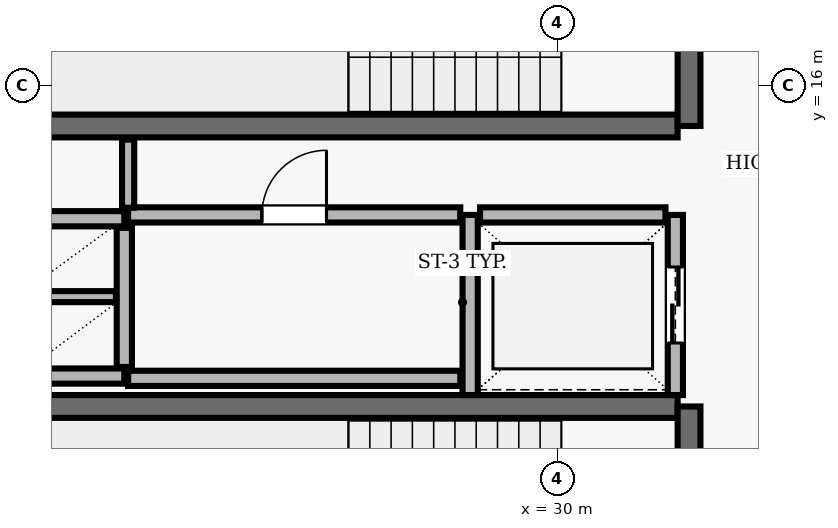
"""IFC4 building model, lengths in metres.
Left out: names, types, materials, properties, quantities, classifications, styles, units other than length and angle.
Written with IfcOpenShell. Run it as: python <this file> out.ifc"""

import sys

from ifc_helpers import new_model, si_unit, direction, frame, frame_2d, origin, place, context, subcontext, project, spatial, rectangle, extrude, element, fill, save


model = new_model("IFC4")
c1 = context("Model", 3, precision=1e-05, world=origin(), true_north=direction((0.0, 1.0)))
c2 = subcontext(c1, "Body", "Model", "MODEL_VIEW")
j1 = project(units=[si_unit("LENGTHUNIT", "METRE"), si_unit("PLANEANGLEUNIT", "RADIAN")], contexts=[c1])
p1 = place(None, origin())
s1 = spatial("IfcSite", under=j1, at=p1, CompositionType="ELEMENT")
p2 = place(p1, origin())
s2 = spatial("IfcBuilding", under=s1, at=p2, CompositionType="ELEMENT")
p3 = place(p2, frame((0.0, 0.0, 252.1)))
s3 = spatial("IfcBuildingStorey", under=s2, at=p3, CompositionType="ELEMENT", Elevation=252.1)
p4 = place(p3, frame((23.22, 15.47, 0.0), z_axis=(0.0, 0.0, 1.0), x_axis=(1.0, 0.0, 0.0)))
e1 = element("IfcWall", 1, at=p4, inside=s3, PredefinedType="SHEAR", context=c2, shape_type="SweptSolid", body=[
    extrude(rectangle(XDim=8.36, YDim=0.3, at=frame_2d((4.18, 0.0))), origin(), (0.0, 0.0, 1.0), 3.69),
])
p5 = place(p3, frame((31.73, 15.47, 0.0), z_axis=(0.0, 0.0, 1.0), x_axis=(0.0, 1.0, 0.0)))
e2 = element("IfcWall", 2, at=p5, inside=s3, PredefinedType="SHEAR", context=c2, shape_type="SweptSolid", body=[
    extrude(rectangle(XDim=3.51, YDim=0.3, at=frame_2d((1.755, 0.0))), origin(), (0.0, 0.0, 1.0), 3.69),
])
p6 = place(p5, frame((1.18, 0.0, 0.0)))
e3 = element("IfcOpeningElement", 3, at=p6, cuts=e2, PredefinedType="OPENING", context=c2, shape_type="SweptSolid", body=[
    extrude(rectangle(XDim=1.15, YDim=2.15, at=frame_2d((0.575, 1.075))), frame((0.0, 0.16, 0.0), z_axis=(0.0, -1.0, 0.0), x_axis=(1.0, 0.0, 0.0)), (0.0, 0.0, 1.0), 0.32),
])
p7 = place(p3, frame((31.58, 11.78, 0.0), z_axis=(0.0, 0.0, 1.0), x_axis=(-1.0, 0.0, 0.0)))
e4 = element("IfcWall", 4, at=p7, inside=s3, PredefinedType="SHEAR", context=c2, shape_type="SweptSolid", body=[
    extrude(rectangle(XDim=8.36, YDim=0.3, at=frame_2d((4.18, 0.0))), origin(), (0.0, 0.0, 1.0), 3.69),
])
p8 = place(p3, frame((31.73, 8.27, 0.0), z_axis=(0.0, 0.0, 1.0), x_axis=(0.0, 1.0, 0.0)))
e5 = element("IfcWall", 5, at=p8, inside=s3, PredefinedType="SHEAR", context=c2, shape_type="SweptSolid", body=[
    extrude(rectangle(XDim=3.51, YDim=0.3, at=frame_2d((1.755, 0.0))), origin(), (0.0, 0.0, 1.0), 3.69),
])
p9 = place(p8, frame((1.18, 0.0, 0.0)))
e6 = element("IfcOpeningElement", 6, at=p9, cuts=e5, PredefinedType="OPENING", context=c2, shape_type="SweptSolid", body=[
    extrude(rectangle(XDim=1.15, YDim=2.15, at=frame_2d((0.575, 1.075))), frame((0.0, 0.16, 0.0), z_axis=(0.0, -1.0, 0.0), x_axis=(1.0, 0.0, 0.0)), (0.0, 0.0, 1.0), 0.32),
])
p10 = place(p3, frame((28.85, 14.3, 0.0), z_axis=(0.0, 0.0, 1.0), x_axis=(0.0, -1.0, 0.0)))
e7 = element("IfcWall", 7, at=p10, inside=s3, PredefinedType="SOLIDWALL", context=c2, shape_type="SweptSolid", body=[
    extrude(rectangle(XDim=2.37, YDim=0.2, at=frame_2d((1.185, 0.0))), origin(), (0.0, 0.0, 1.0), 3.69),
])
p11 = place(p3, frame((31.55, 11.93, 0.0), z_axis=(0.0, 0.0, 1.0), x_axis=(0.0, 1.0, 0.0)))
e8 = element("IfcWall", 8, at=p11, inside=s3, PredefinedType="SOLIDWALL", context=c2, shape_type="SweptSolid", body=[
    extrude(rectangle(XDim=2.37, YDim=0.2, at=frame_2d((1.185, 0.0))), origin(), (0.0, 0.0, 1.0), 3.69),
])
p12 = place(p11, frame((0.685, 0.0, 0.0)))
e9 = element("IfcOpeningElement", 9, at=p12, cuts=e8, PredefinedType="OPENING", context=c2, shape_type="SweptSolid", body=[
    extrude(rectangle(XDim=1.0, YDim=2.1, at=frame_2d((0.5, 1.05))), frame((0.0, 0.11, 0.0), z_axis=(0.0, -1.0, 0.0), x_axis=(1.0, 0.0, 0.0)), (0.0, 0.0, 1.0), 0.22),
])
p13 = place(p3, frame((31.42, 14.3, 0.0), z_axis=(0.0, 0.0, 1.0), x_axis=(-1.0, 0.0, 0.0)))
e10 = element("IfcWall", 10, at=p13, inside=s3, PredefinedType="SOLIDWALL", context=c2, shape_type="SweptSolid", body=[
    extrude(rectangle(XDim=2.44, YDim=0.2, at=frame_2d((1.22, 0.0))), origin(), (0.0, 0.0, 1.0), 3.69),
])
for number, where, z_axis, x_axis in (
    (11, (22.9, 14.25, 0.0), (0.0, 0.0, 1.0), (1.0, 0.0, 0.0)),
    (12, (22.9, 12.18, 0.0), (0.0, 0.0, 1.0), (1.0, 0.0, 0.0)),
):
    element("IfcWall", number, at=place(p3, frame(where, z_axis=z_axis, x_axis=x_axis)), inside=s3, PredefinedType="SOLIDWALL", context=c2, shape_type="SweptSolid", body=[
        extrude(rectangle(XDim=1.4, YDim=0.2, at=frame_2d((0.7, 0.0))), origin(), (0.0, 0.0, 1.0), 3.69),
    ])
p14 = place(p3, frame((24.3, 12.3, 0.0), z_axis=(0.0, 0.0, 1.0), x_axis=(0.0, 1.0, 0.0)))
e13 = element("IfcWall", 13, at=p14, inside=s3, PredefinedType="SOLIDWALL", context=c2, shape_type="SweptSolid", body=[
    extrude(rectangle(XDim=1.83, YDim=0.2, at=frame_2d((0.915, 0.0))), origin(), (0.0, 0.0, 1.0), 3.69),
])
p15 = place(p3, frame((23.01, 13.225, 0.0), z_axis=(0.0, 0.0, 1.0), x_axis=(1.0, 0.0, 0.0)))
e14 = element("IfcWall", 14, at=p15, inside=s3, PredefinedType="PARTITIONING", context=c2, shape_type="SweptSolid", body=[
    extrude(rectangle(XDim=1.18, YDim=0.145, at=frame_2d((0.59, 0.0))), origin(), (0.0, 0.0, 1.0), 3.69),
])
p16 = place(p3, frame((24.35, 12.15, 0.0), z_axis=(0.0, 0.0, 1.0), x_axis=(1.0, 0.0, 0.0)))
e15 = element("IfcWall", 15, at=p16, inside=s3, PredefinedType="SOLIDWALL", context=c2, shape_type="SweptSolid", body=[
    extrude(rectangle(XDim=4.37, YDim=0.2, at=frame_2d((2.185, 0.0))), origin(), (0.0, 0.0, 1.0), 3.69),
])
p17 = place(p3, frame((24.35, 14.3, 0.0), z_axis=(0.0, 0.0, 1.0), x_axis=(1.0, 0.0, 0.0)))
e16 = element("IfcWall", 16, at=p17, inside=s3, PredefinedType="SOLIDWALL", context=c2, shape_type="SweptSolid", body=[
    extrude(rectangle(XDim=4.37, YDim=0.2, at=frame_2d((2.185, 0.0))), origin(), (0.0, 0.0, 1.0), 3.69),
])
p18 = place(p17, frame((1.76, 0.0, 0.0)))
e17 = element("IfcOpeningElement", 17, at=p18, cuts=e16, PredefinedType="OPENING", context=c2, shape_type="SweptSolid", body=[
    extrude(rectangle(XDim=0.85, YDim=2.1, at=frame_2d((0.425, 1.05))), frame((0.0, 0.11, 0.0), z_axis=(0.0, -1.0, 0.0), x_axis=(1.0, 0.0, 0.0)), (0.0, 0.0, 1.0), 0.22),
])
p19 = place(p3, frame((24.35, 15.29, 0.0), z_axis=(0.0, 0.0, 1.0), x_axis=(0.0, -1.0, 0.0)))
e18 = element("IfcWall", 18, at=p19, inside=s3, PredefinedType="PARTITIONING", context=c2, shape_type="SweptSolid", body=[
    extrude(rectangle(XDim=0.895, YDim=0.16, at=frame_2d((0.448, 0.0))), origin(), (0.0, 0.0, 1.0), 3.69),
])
p20 = place(p12, origin())
e19 = element("IfcDoor", 19, at=p20, inside=s3, OperationType="DOUBLE_DOOR_SLIDING", PredefinedType="DOOR", context=c2, shape_type="SweptSolid", body=[
    extrude(rectangle(XDim=1.0, YDim=2.1, at=frame_2d((0.5, 1.05))), frame((0.0, 0.025, 0.0), z_axis=(0.0, -1.0, 0.0), x_axis=(1.0, 0.0, 0.0)), (0.0, 0.0, 1.0), 0.05),
])
fill(e9, e19)
p21 = place(p18, origin())
e20 = element("IfcDoor", 20, at=p21, inside=s3, OperationType="SINGLE_SWING_RIGHT", PredefinedType="DOOR", context=c2, shape_type="SweptSolid", body=[
    extrude(rectangle(XDim=0.85, YDim=2.1, at=frame_2d((0.425, 1.05))), frame((0.0, 0.025, 0.0), z_axis=(0.0, -1.0, 0.0), x_axis=(1.0, 0.0, 0.0)), (0.0, 0.0, 1.0), 0.05),
])
fill(e17, e20)
save(model, sys.argv[1])
